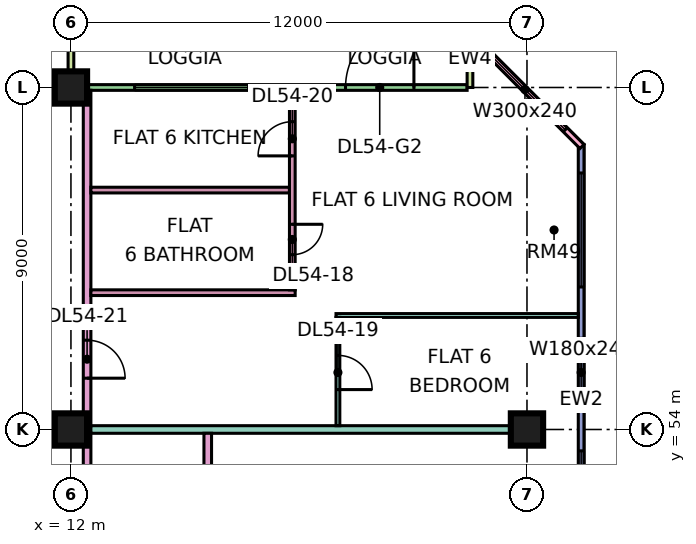
"""IFC4 building model, lengths in metres.
Left out: names, types, materials, properties, quantities, classifications, styles, units other than length and angle.
Written with IfcOpenShell. Run it as: python <this file> out.ifc"""

import sys

from ifc_helpers import new_model, si_unit, direction, frame, frame_2d, origin, origin_2d, place, context, subcontext, project, spatial, rectangle, extrude, element, fill, save


model = new_model("IFC4")
c1 = context("Model", 3, precision=1e-05, world=origin(), true_north=direction((0.0, 1.0)))
c2 = subcontext(c1, "Body", "Model", "MODEL_VIEW")
j1 = project(units=[si_unit("LENGTHUNIT", "METRE"), si_unit("PLANEANGLEUNIT", "RADIAN")], contexts=[c1])
p1 = place(None, origin())
s1 = spatial("IfcSite", under=j1, at=p1, CompositionType="ELEMENT")
p2 = place(p1, origin())
s2 = spatial("IfcBuilding", under=s1, at=p2, CompositionType="ELEMENT")
p3 = place(p2, frame((0.0, 0.0, 230.4)))
s3 = spatial("IfcBuildingStorey", under=s2, at=p3, CompositionType="ELEMENT", Elevation=230.4)
for number, where, z_axis, x_axis in (
    (1, (12.0, 54.0, 0.0), (0.0, 0.0, 1.0), (1.0, 0.0, 0.0)),
    (2, (12.0, 63.0, 0.0), (0.0, 0.0, 1.0), (1.0, 0.0, 0.0)),
    (3, (24.0, 54.0, 0.0), (0.0, 0.0, 1.0), (1.0, 0.0, 0.0)),
):
    element("IfcColumn", number, at=place(p3, frame(where, z_axis=z_axis, x_axis=x_axis)), inside=s3, PredefinedType="COLUMN", context=c2, shape_type="SweptSolid", body=[
        extrude(rectangle(XDim=0.85, YDim=0.85, at=origin_2d()), origin(), (0.0, 0.0, 1.0), 3.75),
    ])
p4 = place(p3, frame((25.425, 48.075, 0.0), z_axis=(0.0, 0.0, 1.0), x_axis=(0.0, 1.0, 0.0)))
e4 = element("IfcWall", 4, at=p4, inside=s3, PredefinedType="SOLIDWALL", context=c2, shape_type="SweptSolid", body=[
    extrude(rectangle(XDim=13.425, YDim=0.15, at=frame_2d((6.712, 0.0))), origin(), (0.0, 0.0, 1.0), 3.35),
])
p5 = place(p4, frame((0.562, 0.0, 0.45)))
e5 = element("IfcOpeningElement", 5, at=p5, cuts=e4, PredefinedType="OPENING", context=c2, shape_type="SweptSolid", body=[
    extrude(rectangle(XDim=4.8, YDim=2.4, at=frame_2d((2.4, 1.2))), frame((0.0, 0.085, 0.0), z_axis=(0.0, -1.0, 0.0), x_axis=(1.0, 0.0, 0.0)), (0.0, 0.0, 1.0), 0.17),
])
p6 = place(p4, frame((6.525, 0.0, 0.45)))
e6 = element("IfcOpeningElement", 6, at=p6, cuts=e4, PredefinedType="OPENING", context=c2, shape_type="SweptSolid", body=[
    extrude(rectangle(XDim=1.8, YDim=2.4, at=frame_2d((0.9, 1.2))), frame((0.0, 0.085, 0.0), z_axis=(0.0, -1.0, 0.0), x_axis=(1.0, 0.0, 0.0)), (0.0, 0.0, 1.0), 0.17),
])
p7 = place(p4, frame((9.675, 0.0, 0.45)))
e7 = element("IfcOpeningElement", 7, at=p7, cuts=e4, PredefinedType="OPENING", context=c2, shape_type="SweptSolid", body=[
    extrude(rectangle(XDim=3.0, YDim=2.4, at=frame_2d((1.5, 1.2))), frame((0.0, 0.085, 0.0), z_axis=(0.0, -1.0, 0.0), x_axis=(1.0, 0.0, 0.0)), (0.0, 0.0, 1.0), 0.17),
])
p8 = place(p3, frame((25.447, 61.447, 0.0), z_axis=(0.0, 0.0, 1.0), x_axis=(-0.707106781187, 0.707106781187, 0.0)))
e8 = element("IfcWall", 8, at=p8, inside=s3, PredefinedType="SOLIDWALL", context=c2, shape_type="SweptSolid", body=[
    extrude(rectangle(XDim=4.243, YDim=0.15, at=frame_2d((2.121, 0.0))), origin(), (0.0, 0.0, 1.0), 3.35),
])
p9 = place(p8, frame((0.621, 0.0, 0.45)))
e9 = element("IfcOpeningElement", 9, at=p9, cuts=e8, PredefinedType="OPENING", context=c2, shape_type="SweptSolid", body=[
    extrude(rectangle(XDim=3.0, YDim=2.4, at=frame_2d((1.5, 1.2))), frame((0.0, 0.085, 0.0), z_axis=(0.0, -1.0, 0.0), x_axis=(1.0, 0.0, 0.0)), (0.0, 0.0, 1.0), 0.17),
])
p10 = place(p3, frame((22.425, 63.0, 0.0), z_axis=(0.0, 0.0, 1.0), x_axis=(-1.0, 0.0, 0.0)))
e10 = element("IfcWall", 10, at=p10, inside=s3, PredefinedType="SOLIDWALL", context=c2, shape_type="SweptSolid", body=[
    extrude(rectangle(XDim=10.35, YDim=0.15, at=frame_2d((5.175, 0.0))), origin(), (0.0, 0.0, 1.0), 3.35),
])
p11 = place(p10, frame((1.4, 0.0, 0.0)))
e11 = element("IfcOpeningElement", 11, at=p11, cuts=e10, PredefinedType="OPENING", context=c2, shape_type="SweptSolid", body=[
    extrude(rectangle(XDim=1.8, YDim=2.4, at=frame_2d((0.9, 1.2))), frame((0.0, 0.085, 0.0), z_axis=(0.0, -1.0, 0.0), x_axis=(1.0, 0.0, 0.0)), (0.0, 0.0, 1.0), 0.17),
])
p12 = place(p10, frame((5.75, 0.0, 0.45)))
e12 = element("IfcOpeningElement", 12, at=p12, cuts=e10, PredefinedType="OPENING", context=c2, shape_type="SweptSolid", body=[
    extrude(rectangle(XDim=3.0, YDim=2.4, at=frame_2d((1.5, 1.2))), frame((0.0, 0.085, 0.0), z_axis=(0.0, -1.0, 0.0), x_axis=(1.0, 0.0, 0.0)), (0.0, 0.0, 1.0), 0.17),
])
for number, where, z_axis, x_axis in (
    (13, (22.5, 64.5, 0.0), (0.0, 0.0, 1.0), (0.0, -1.0, 0.0)),
    (14, (12.0, 64.5, 0.0), (0.0, 0.0, 1.0), (0.0, -1.0, 0.0)),
):
    element("IfcWall", number, at=place(p3, frame(where, z_axis=z_axis, x_axis=x_axis)), inside=s3, PredefinedType="SOLIDWALL", context=c2, shape_type="SweptSolid", body=[
        extrude(rectangle(XDim=1.5, YDim=0.15, at=frame_2d((0.75, 0.0))), origin(), (0.0, 0.0, 1.0), 3.35),
    ])
p13 = place(p3, frame((12.425, 20.0, 0.0), z_axis=(0.0, 0.0, 1.0), x_axis=(0.0, 1.0, 0.0)))
e15 = element("IfcWall", 15, at=p13, inside=s3, PredefinedType="PARTITIONING", context=c2, shape_type="SweptSolid", body=[
    extrude(rectangle(XDim=42.926, YDim=0.2, at=frame_2d((21.463, 0.0))), origin(), (0.0, 0.0, 1.0), 3.35),
])
p14 = place(p13, frame((6.7, 0.0, 0.0)))
e16 = element("IfcOpeningElement", 16, at=p14, cuts=e15, PredefinedType="OPENING", context=c2, shape_type="SweptSolid", body=[
    extrude(rectangle(XDim=1.6, YDim=2.1, at=frame_2d((0.8, 1.05))), frame((0.0, 0.11, 0.0), z_axis=(0.0, -1.0, 0.0), x_axis=(1.0, 0.0, 0.0)), (0.0, 0.0, 1.0), 0.22),
])
p15 = place(p13, frame((12.95, 0.0, 0.0)))
e17 = element("IfcOpeningElement", 17, at=p15, cuts=e15, PredefinedType="OPENING", context=c2, shape_type="SweptSolid", body=[
    extrude(rectangle(XDim=1.0, YDim=2.1, at=frame_2d((0.5, 1.05))), frame((0.0, 0.11, 0.0), z_axis=(0.0, -1.0, 0.0), x_axis=(1.0, 0.0, 0.0)), (0.0, 0.0, 1.0), 0.22),
])
p16 = place(p13, frame((23.2, 0.0, 0.0)))
e18 = element("IfcOpeningElement", 18, at=p16, cuts=e15, PredefinedType="OPENING", context=c2, shape_type="SweptSolid", body=[
    extrude(rectangle(XDim=1.0, YDim=2.1, at=frame_2d((0.5, 1.05))), frame((0.0, 0.11, 0.0), z_axis=(0.0, -1.0, 0.0), x_axis=(1.0, 0.0, 0.0)), (0.0, 0.0, 1.0), 0.22),
])
p17 = place(p13, frame((35.35, 0.0, 0.0)))
e19 = element("IfcOpeningElement", 19, at=p17, cuts=e15, PredefinedType="OPENING", context=c2, shape_type="SweptSolid", body=[
    extrude(rectangle(XDim=1.0, YDim=2.1, at=frame_2d((0.5, 1.05))), frame((0.0, 0.11, 0.0), z_axis=(0.0, -1.0, 0.0), x_axis=(1.0, 0.0, 0.0)), (0.0, 0.0, 1.0), 0.22),
])
p18 = place(p13, frame((1.15, 0.0, 0.0)))
e20 = element("IfcOpeningElement", 20, at=p18, cuts=e15, PredefinedType="OPENING", context=c2, shape_type="SweptSolid", body=[
    extrude(rectangle(XDim=1.8, YDim=2.1, at=frame_2d((0.9, 1.05))), frame((0.0, 0.11, 0.0), z_axis=(0.0, -1.0, 0.0), x_axis=(1.0, 0.0, 0.0)), (0.0, 0.0, 1.0), 0.22),
])
p19 = place(p13, frame((28.6, 0.0, 0.0)))
e21 = element("IfcOpeningElement", 21, at=p19, cuts=e15, PredefinedType="OPENING", context=c2, shape_type="SweptSolid", body=[
    extrude(rectangle(XDim=1.8, YDim=2.1, at=frame_2d((0.9, 1.05))), frame((0.0, 0.11, 0.0), z_axis=(0.0, -1.0, 0.0), x_axis=(1.0, 0.0, 0.0)), (0.0, 0.0, 1.0), 0.22),
])
p20 = place(p3, frame((12.525, 54.0, 0.0), z_axis=(0.0, 0.0, 1.0), x_axis=(1.0, 0.0, 0.0)))
e22 = element("IfcWall", 22, at=p20, inside=s3, PredefinedType="PARTITIONING", context=c2, shape_type="SweptSolid", body=[
    extrude(rectangle(XDim=11.475, YDim=0.2, at=frame_2d((5.738, 0.0))), origin(), (0.0, 0.0, 1.0), 3.35),
])
p21 = place(p3, frame((12.525, 57.6, 0.0), z_axis=(0.0, 0.0, 1.0), x_axis=(1.0, 0.0, 0.0)))
e23 = element("IfcWall", 23, at=p21, inside=s3, PredefinedType="PARTITIONING", context=c2, shape_type="SweptSolid", body=[
    extrude(rectangle(XDim=5.375, YDim=0.15, at=frame_2d((2.688, 0.0))), origin(), (0.0, 0.0, 1.0), 3.35),
])
p22 = place(p3, frame((12.525, 60.3, 0.0), z_axis=(0.0, 0.0, 1.0), x_axis=(1.0, 0.0, 0.0)))
e24 = element("IfcWall", 24, at=p22, inside=s3, PredefinedType="PARTITIONING", context=c2, shape_type="SweptSolid", body=[
    extrude(rectangle(XDim=5.225, YDim=0.15, at=frame_2d((2.613, 0.0))), origin(), (0.0, 0.0, 1.0), 3.35),
])
p23 = place(p3, frame((15.6, 51.225, 0.0), z_axis=(0.0, 0.0, 1.0), x_axis=(0.0, 1.0, 0.0)))
e25 = element("IfcWall", 25, at=p23, inside=s3, PredefinedType="PARTITIONING", context=c2, shape_type="SweptSolid", body=[
    extrude(rectangle(XDim=2.675, YDim=0.2, at=frame_2d((1.337, 0.0))), origin(), (0.0, 0.0, 1.0), 3.35),
])
p24 = place(p3, frame((17.825, 57.675, 0.0), z_axis=(0.0, 0.0, 1.0), x_axis=(0.0, 1.0, 0.0)))
e26 = element("IfcWall", 26, at=p24, inside=s3, PredefinedType="PARTITIONING", context=c2, shape_type="SweptSolid", body=[
    extrude(rectangle(XDim=5.251, YDim=0.15, at=frame_2d((2.625, 0.0))), origin(), (0.0, 0.0, 1.0), 3.35),
])
p25 = place(p24, frame((0.925, 0.0, 0.0)))
e27 = element("IfcOpeningElement", 27, at=p25, cuts=e26, PredefinedType="OPENING", context=c2, shape_type="SweptSolid", body=[
    extrude(rectangle(XDim=0.8, YDim=2.1, at=frame_2d((0.4, 1.05))), frame((0.0, 0.085, 0.0), z_axis=(0.0, -1.0, 0.0), x_axis=(1.0, 0.0, 0.0)), (0.0, 0.0, 1.0), 0.17),
])
p26 = place(p24, frame((3.525, 0.0, 0.0)))
e28 = element("IfcOpeningElement", 28, at=p26, cuts=e26, PredefinedType="OPENING", context=c2, shape_type="SweptSolid", body=[
    extrude(rectangle(XDim=0.9, YDim=2.1, at=frame_2d((0.45, 1.05))), frame((0.0, 0.085, 0.0), z_axis=(0.0, -1.0, 0.0), x_axis=(1.0, 0.0, 0.0)), (0.0, 0.0, 1.0), 0.17),
])
p27 = place(p3, frame((18.975, 57.0, 0.0), z_axis=(0.0, 0.0, 1.0), x_axis=(1.0, 0.0, 0.0)))
e29 = element("IfcWall", 29, at=p27, inside=s3, PredefinedType="PARTITIONING", context=c2, shape_type="SweptSolid", body=[
    extrude(rectangle(XDim=6.375, YDim=0.1, at=frame_2d((3.188, 0.0))), origin(), (0.0, 0.0, 1.0), 3.35),
])
p28 = place(p3, frame((19.025, 54.1, 0.0), z_axis=(0.0, 0.0, 1.0), x_axis=(0.0, 1.0, 0.0)))
e30 = element("IfcWall", 30, at=p28, inside=s3, PredefinedType="PARTITIONING", context=c2, shape_type="SweptSolid", body=[
    extrude(rectangle(XDim=2.85, YDim=0.1, at=frame_2d((1.425, 0.0))), origin(), (0.0, 0.0, 1.0), 3.35),
])
p29 = place(p28, frame((0.95, 0.0, 0.0)))
e31 = element("IfcOpeningElement", 31, at=p29, cuts=e30, PredefinedType="OPENING", context=c2, shape_type="SweptSolid", body=[
    extrude(rectangle(XDim=0.9, YDim=2.1, at=frame_2d((0.45, 1.05))), frame((0.0, 0.06, 0.0), z_axis=(0.0, -1.0, 0.0), x_axis=(1.0, 0.0, 0.0)), (0.0, 0.0, 1.0), 0.12),
])
p30 = place(p5, origin())
e32 = element("IfcWindow", 32, at=p30, inside=s3, PartitioningType="SINGLE_PANEL", PredefinedType="WINDOW", context=c2, shape_type="SweptSolid", body=[
    extrude(rectangle(XDim=4.8, YDim=2.4, at=frame_2d((2.4, 1.2))), frame((0.0, 0.03, 0.0), z_axis=(0.0, -1.0, 0.0), x_axis=(1.0, 0.0, 0.0)), (0.0, 0.0, 1.0), 0.06),
])
fill(e5, e32)
p31 = place(p6, origin())
e33 = element("IfcWindow", 33, at=p31, inside=s3, PartitioningType="SINGLE_PANEL", PredefinedType="WINDOW", context=c2, shape_type="SweptSolid", body=[
    extrude(rectangle(XDim=1.8, YDim=2.4, at=frame_2d((0.9, 1.2))), frame((0.0, 0.03, 0.0), z_axis=(0.0, -1.0, 0.0), x_axis=(1.0, 0.0, 0.0)), (0.0, 0.0, 1.0), 0.06),
])
fill(e6, e33)
p32 = place(p7, origin())
e34 = element("IfcWindow", 34, at=p32, inside=s3, PartitioningType="SINGLE_PANEL", PredefinedType="WINDOW", context=c2, shape_type="SweptSolid", body=[
    extrude(rectangle(XDim=3.0, YDim=2.4, at=frame_2d((1.5, 1.2))), frame((0.0, 0.03, 0.0), z_axis=(0.0, -1.0, 0.0), x_axis=(1.0, 0.0, 0.0)), (0.0, 0.0, 1.0), 0.06),
])
fill(e7, e34)
p33 = place(p9, origin())
e35 = element("IfcWindow", 35, at=p33, inside=s3, PartitioningType="SINGLE_PANEL", PredefinedType="WINDOW", context=c2, shape_type="SweptSolid", body=[
    extrude(rectangle(XDim=3.0, YDim=2.4, at=frame_2d((1.5, 1.2))), frame((0.0, 0.03, 0.0), z_axis=(0.0, -1.0, 0.0), x_axis=(1.0, 0.0, 0.0)), (0.0, 0.0, 1.0), 0.06),
])
fill(e9, e35)
p34 = place(p11, frame((1.8, 0.0, 0.0), z_axis=(0.0, 0.0, 1.0), x_axis=(-1.0, 0.0, 0.0)))
e36 = element("IfcDoor", 36, at=p34, inside=s3, OperationType="DOUBLE_DOOR_SINGLE_SWING", PredefinedType="DOOR", context=c2, shape_type="SweptSolid", body=[
    extrude(rectangle(XDim=1.8, YDim=2.4, at=frame_2d((0.9, 1.2))), frame((0.0, 0.025, 0.0), z_axis=(0.0, -1.0, 0.0), x_axis=(1.0, 0.0, 0.0)), (0.0, 0.0, 1.0), 0.05),
])
fill(e11, e36)
p35 = place(p12, origin())
e37 = element("IfcWindow", 37, at=p35, inside=s3, PartitioningType="SINGLE_PANEL", PredefinedType="WINDOW", context=c2, shape_type="SweptSolid", body=[
    extrude(rectangle(XDim=3.0, YDim=2.4, at=frame_2d((1.5, 1.2))), frame((0.0, 0.03, 0.0), z_axis=(0.0, -1.0, 0.0), x_axis=(1.0, 0.0, 0.0)), (0.0, 0.0, 1.0), 0.06),
])
fill(e12, e37)
p36 = place(p25, origin())
e38 = element("IfcDoor", 38, at=p36, inside=s3, OperationType="SINGLE_SWING_RIGHT", PredefinedType="DOOR", context=c2, shape_type="SweptSolid", body=[
    extrude(rectangle(XDim=0.8, YDim=2.1, at=frame_2d((0.4, 1.05))), frame((0.0, 0.025, 0.0), z_axis=(0.0, -1.0, 0.0), x_axis=(1.0, 0.0, 0.0)), (0.0, 0.0, 1.0), 0.05),
])
fill(e27, e38)
p37 = place(p29, frame((0.9, 0.0, 0.0), z_axis=(0.0, 0.0, 1.0), x_axis=(-1.0, 0.0, 0.0)))
e39 = element("IfcDoor", 39, at=p37, inside=s3, OperationType="SINGLE_SWING_LEFT", PredefinedType="DOOR", context=c2, shape_type="SweptSolid", body=[
    extrude(rectangle(XDim=0.9, YDim=2.1, at=frame_2d((0.45, 1.05))), frame((0.0, 0.025, 0.0), z_axis=(0.0, -1.0, 0.0), x_axis=(1.0, 0.0, 0.0)), (0.0, 0.0, 1.0), 0.05),
])
fill(e31, e39)
p38 = place(p26, origin())
e40 = element("IfcDoor", 40, at=p38, inside=s3, OperationType="SINGLE_SWING_LEFT", PredefinedType="DOOR", context=c2, shape_type="SweptSolid", body=[
    extrude(rectangle(XDim=0.9, YDim=2.1, at=frame_2d((0.45, 1.05))), frame((0.0, 0.025, 0.0), z_axis=(0.0, -1.0, 0.0), x_axis=(1.0, 0.0, 0.0)), (0.0, 0.0, 1.0), 0.05),
])
fill(e28, e40)
p39 = place(p17, frame((1.0, 0.0, 0.0), z_axis=(0.0, 0.0, 1.0), x_axis=(-1.0, 0.0, 0.0)))
e41 = element("IfcDoor", 41, at=p39, inside=s3, OperationType="SINGLE_SWING_LEFT", PredefinedType="DOOR", context=c2, shape_type="SweptSolid", body=[
    extrude(rectangle(XDim=1.0, YDim=2.1, at=frame_2d((0.5, 1.05))), frame((0.0, 0.025, 0.0), z_axis=(0.0, -1.0, 0.0), x_axis=(1.0, 0.0, 0.0)), (0.0, 0.0, 1.0), 0.05),
])
fill(e19, e41)
save(model, sys.argv[1])
